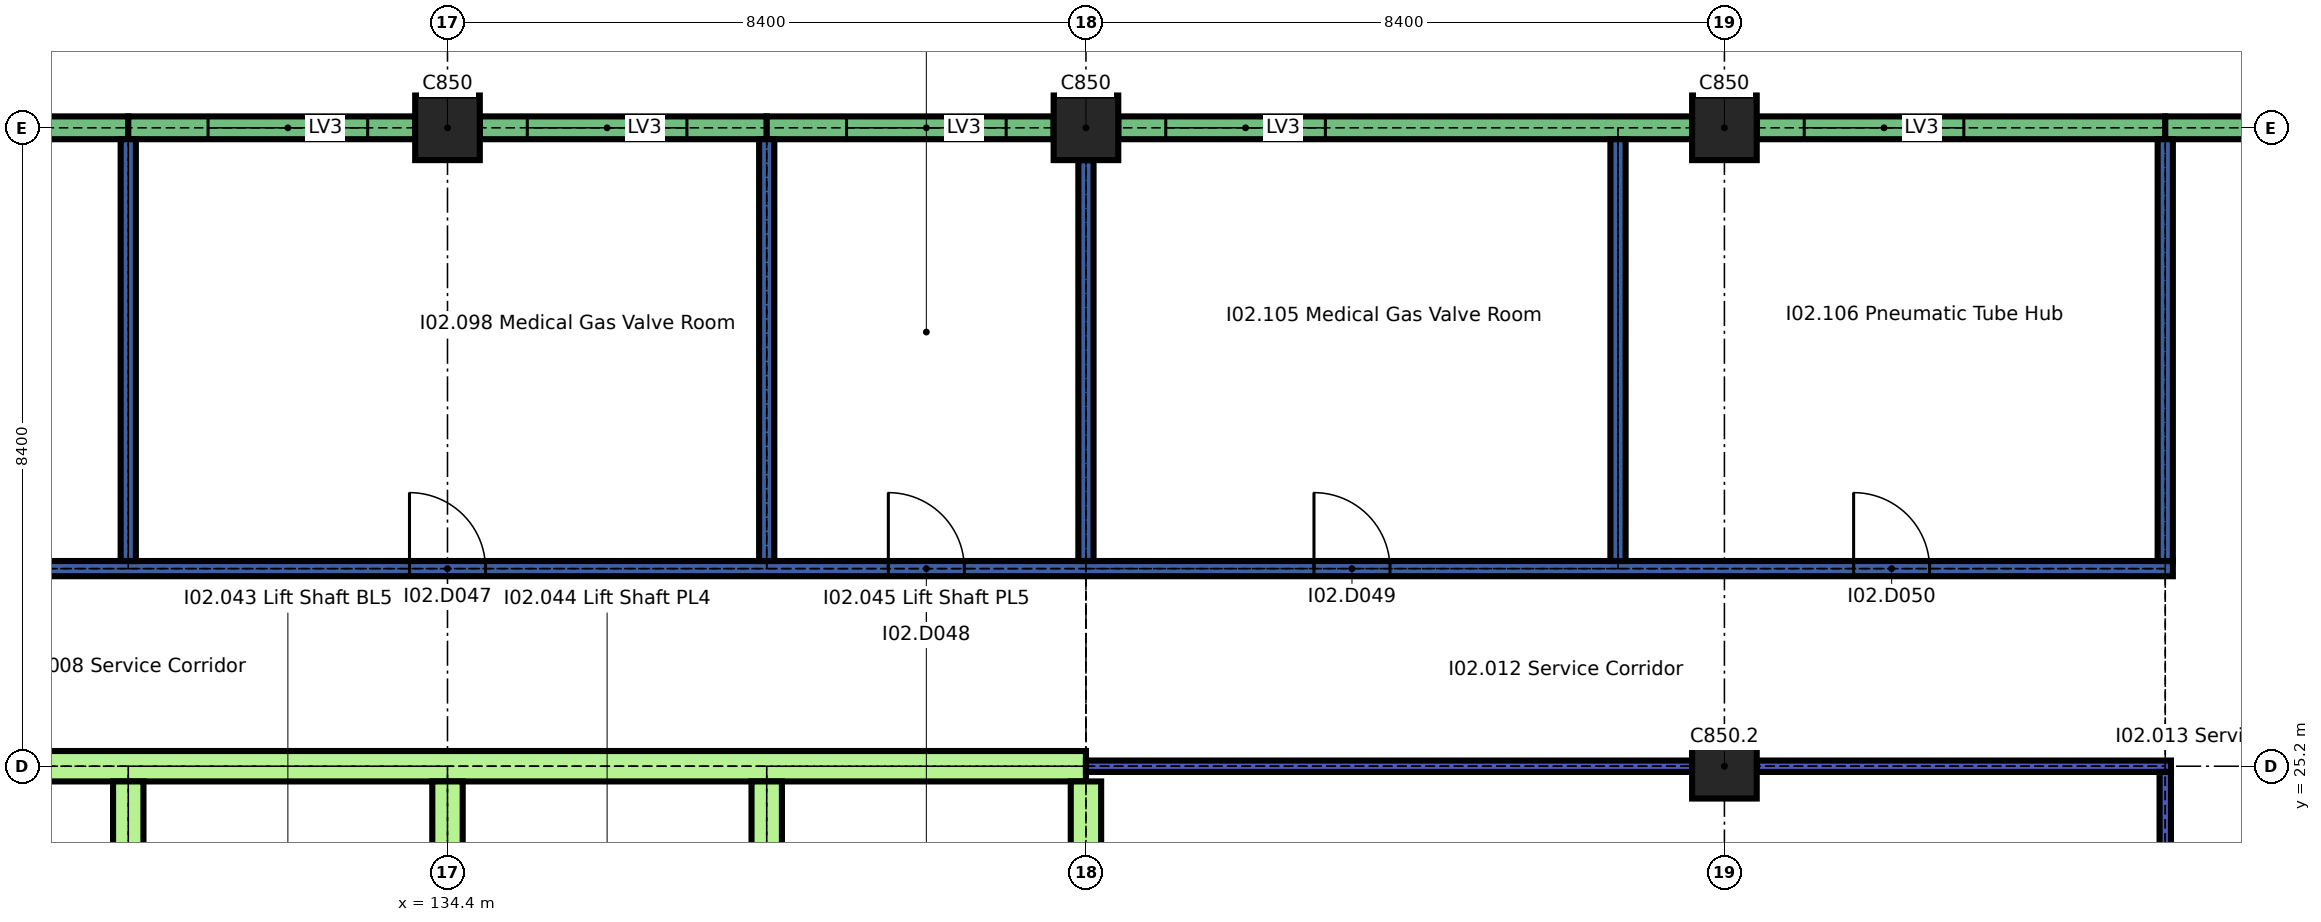
"""IFC4 building model, lengths in metres.
Left out: names, types, materials, properties, quantities, classifications, styles, units other than length and angle.
Written with IfcOpenShell. Run it as: python <this file> out.ifc"""

import sys

from ifc_helpers import new_model, si_unit, direction, frame, frame_2d, origin, origin_2d, place, context, subcontext, project, spatial, rectangle, extrude, element, fill, save


model = new_model("IFC4")
c1 = context("Model", 3, precision=1e-05, world=origin(), true_north=direction((0.0, 1.0)))
c2 = subcontext(c1, "Body", "Model", "MODEL_VIEW")
j1 = project(units=[si_unit("LENGTHUNIT", "METRE"), si_unit("PLANEANGLEUNIT", "RADIAN")], contexts=[c1])
p1 = place(None, origin())
s1 = spatial("IfcSite", under=j1, at=p1, CompositionType="ELEMENT")
p2 = place(p1, origin())
s2 = spatial("IfcBuilding", under=s1, at=p2, CompositionType="ELEMENT")
p3 = place(p2, frame((0.0, 0.0, 12.9)))
s3 = spatial("IfcBuildingStorey", under=s2, at=p3, CompositionType="ELEMENT", Elevation=12.9)
for number, where, z_axis, x_axis in (
    (1, (151.2, 25.2, 0.0), (0.0, 0.0, 1.0), (1.0, 0.0, 0.0)),
    (2, (134.4, 33.6, 0.0), (0.0, 0.0, 1.0), (1.0, 0.0, 0.0)),
    (3, (142.8, 33.6, 0.0), (0.0, 0.0, 1.0), (1.0, 0.0, 0.0)),
    (4, (151.2, 33.6, 0.0), (0.0, 0.0, 1.0), (1.0, 0.0, 0.0)),
):
    element("IfcColumn", number, at=place(p3, frame(where, z_axis=z_axis, x_axis=x_axis)), inside=s3, PredefinedType="COLUMN", context=c2, shape_type="SweptSolid", body=[
        extrude(rectangle(XDim=0.85, YDim=0.85, at=origin_2d()), origin(), (0.0, 0.0, 1.0), 2.04),
    ])
p4 = place(p3, frame((126.425, 33.6, 0.0), z_axis=(0.0, 0.0, 1.0), x_axis=(1.0, 0.0, 0.0)))
e5 = element("IfcWall", 5, at=p4, inside=s3, PredefinedType="SOLIDWALL", context=c2, shape_type="SweptSolid", body=[
    extrude(rectangle(XDim=3.775, YDim=0.3, at=frame_2d((1.887, 0.0))), origin(), (0.0, 0.0, 1.0), 1.74),
])
p5 = place(p4, frame((0.625, 0.0, 0.6)))
e6 = element("IfcOpeningElement", 6, at=p5, cuts=e5, PredefinedType="OPENING", context=c2, shape_type="SweptSolid", body=[
    extrude(rectangle(XDim=2.1, YDim=1.05, at=frame_2d((1.05, 0.525))), frame((0.0, 0.16, 0.0), z_axis=(0.0, -1.0, 0.0), x_axis=(1.0, 0.0, 0.0)), (0.0, 0.0, 1.0), 0.32),
])
p6 = place(p3, frame((130.2, 33.6, 0.0), z_axis=(0.0, 0.0, 1.0), x_axis=(1.0, 0.0, 0.0)))
e7 = element("IfcWall", 7, at=p6, inside=s3, PredefinedType="SOLIDWALL", context=c2, shape_type="SweptSolid", body=[
    extrude(rectangle(XDim=3.775, YDim=0.3, at=frame_2d((1.888, 0.0))), origin(), (0.0, 0.0, 1.0), 1.74),
])
p7 = place(p6, frame((1.05, 0.0, 0.6)))
e8 = element("IfcOpeningElement", 8, at=p7, cuts=e7, PredefinedType="OPENING", context=c2, shape_type="SweptSolid", body=[
    extrude(rectangle(XDim=2.1, YDim=1.05, at=frame_2d((1.05, 0.525))), frame((0.0, 0.16, 0.0), z_axis=(0.0, -1.0, 0.0), x_axis=(1.0, 0.0, 0.0)), (0.0, 0.0, 1.0), 0.32),
])
p8 = place(p3, frame((134.825, 33.6, 0.0), z_axis=(0.0, 0.0, 1.0), x_axis=(1.0, 0.0, 0.0)))
e9 = element("IfcWall", 9, at=p8, inside=s3, PredefinedType="SOLIDWALL", context=c2, shape_type="SweptSolid", body=[
    extrude(rectangle(XDim=3.775, YDim=0.3, at=frame_2d((1.888, 0.0))), origin(), (0.0, 0.0, 1.0), 1.74),
])
p9 = place(p8, frame((0.625, 0.0, 0.6)))
e10 = element("IfcOpeningElement", 10, at=p9, cuts=e9, PredefinedType="OPENING", context=c2, shape_type="SweptSolid", body=[
    extrude(rectangle(XDim=2.1, YDim=1.05, at=frame_2d((1.05, 0.525))), frame((0.0, 0.16, 0.0), z_axis=(0.0, -1.0, 0.0), x_axis=(1.0, 0.0, 0.0)), (0.0, 0.0, 1.0), 0.32),
])
p10 = place(p3, frame((138.6, 33.6, 0.0), z_axis=(0.0, 0.0, 1.0), x_axis=(1.0, 0.0, 0.0)))
e11 = element("IfcWall", 11, at=p10, inside=s3, PredefinedType="SOLIDWALL", context=c2, shape_type="SweptSolid", body=[
    extrude(rectangle(XDim=3.775, YDim=0.3, at=frame_2d((1.887, 0.0))), origin(), (0.0, 0.0, 1.0), 1.74),
])
p11 = place(p10, frame((1.05, 0.0, 0.6)))
e12 = element("IfcOpeningElement", 12, at=p11, cuts=e11, PredefinedType="OPENING", context=c2, shape_type="SweptSolid", body=[
    extrude(rectangle(XDim=2.1, YDim=1.05, at=frame_2d((1.05, 0.525))), frame((0.0, 0.16, 0.0), z_axis=(0.0, -1.0, 0.0), x_axis=(1.0, 0.0, 0.0)), (0.0, 0.0, 1.0), 0.32),
])
p12 = place(p3, frame((143.225, 33.6, 0.0), z_axis=(0.0, 0.0, 1.0), x_axis=(1.0, 0.0, 0.0)))
e13 = element("IfcWall", 13, at=p12, inside=s3, PredefinedType="SOLIDWALL", context=c2, shape_type="SweptSolid", body=[
    extrude(rectangle(XDim=7.55, YDim=0.3, at=frame_2d((3.775, 0.0))), origin(), (0.0, 0.0, 1.0), 1.74),
])
p13 = place(p12, frame((0.625, 0.0, 0.6)))
e14 = element("IfcOpeningElement", 14, at=p13, cuts=e13, PredefinedType="OPENING", context=c2, shape_type="SweptSolid", body=[
    extrude(rectangle(XDim=2.1, YDim=1.05, at=frame_2d((1.05, 0.525))), frame((0.0, 0.16, 0.0), z_axis=(0.0, -1.0, 0.0), x_axis=(1.0, 0.0, 0.0)), (0.0, 0.0, 1.0), 0.32),
])
p14 = place(p3, frame((151.625, 33.6, 0.0), z_axis=(0.0, 0.0, 1.0), x_axis=(1.0, 0.0, 0.0)))
e15 = element("IfcWall", 15, at=p14, inside=s3, PredefinedType="SOLIDWALL", context=c2, shape_type="SweptSolid", body=[
    extrude(rectangle(XDim=5.375, YDim=0.3, at=frame_2d((2.688, 0.0))), origin(), (0.0, 0.0, 1.0), 1.74),
])
p15 = place(p14, frame((0.625, 0.0, 0.6)))
e16 = element("IfcOpeningElement", 16, at=p15, cuts=e15, PredefinedType="OPENING", context=c2, shape_type="SweptSolid", body=[
    extrude(rectangle(XDim=2.1, YDim=1.05, at=frame_2d((1.05, 0.525))), frame((0.0, 0.16, 0.0), z_axis=(0.0, -1.0, 0.0), x_axis=(1.0, 0.0, 0.0)), (0.0, 0.0, 1.0), 0.32),
])
p16 = place(p3, frame((157.0, 33.6, 0.0), z_axis=(0.0, 0.0, 1.0), x_axis=(1.0, 0.0, 0.0)))
e17 = element("IfcWall", 17, at=p16, inside=s3, PredefinedType="SOLIDWALL", context=c2, shape_type="SweptSolid", body=[
    extrude(rectangle(XDim=2.175, YDim=0.3, at=frame_2d((1.087, 0.0))), origin(), (0.0, 0.0, 1.0), 1.74),
])
p17 = place(p3, frame((117.6, 25.2, 0.0), z_axis=(0.0, 0.0, 1.0), x_axis=(1.0, 0.0, 0.0)))
e18 = element("IfcWall", 18, at=p17, inside=s3, PredefinedType="SHEAR", context=c2, shape_type="SweptSolid", body=[
    extrude(rectangle(XDim=25.2, YDim=0.4, at=frame_2d((12.6, 0.0))), origin(), (0.0, 0.0, 1.0), 2.04),
])
p18 = place(p3, frame((142.8, 25.2, 0.0), z_axis=(0.0, 0.0, 1.0), x_axis=(1.0, 0.0, 0.0)))
e19 = element("IfcWall", 19, at=p18, inside=s3, PredefinedType="PARTITIONING", context=c2, shape_type="SweptSolid", body=[
    extrude(rectangle(XDim=7.975, YDim=0.15, at=frame_2d((3.987, 0.0))), origin(), (0.0, 0.0, 1.0), 2.04),
])
p19 = place(p3, frame((151.625, 25.2, 0.0), z_axis=(0.0, 0.0, 1.0), x_axis=(1.0, 0.0, 0.0)))
e20 = element("IfcWall", 20, at=p19, inside=s3, PredefinedType="PARTITIONING", context=c2, shape_type="SweptSolid", body=[
    extrude(rectangle(XDim=5.45, YDim=0.15, at=frame_2d((2.725, 0.0))), origin(), (0.0, 0.0, 1.0), 2.04),
])
p20 = place(p3, frame((117.7, 27.8, 0.0), z_axis=(0.0, 0.0, 1.0), x_axis=(1.0, 0.0, 0.0)))
e21 = element("IfcWall", 21, at=p20, inside=s3, PredefinedType="SOLIDWALL", context=c2, shape_type="SweptSolid", body=[
    extrude(rectangle(XDim=39.4, YDim=0.2, at=frame_2d((19.7, 0.0))), origin(), (0.0, 0.0, 1.0), 2.1),
])
p21 = place(p20, frame((5.55, 0.0, 0.0)))
e22 = element("IfcOpeningElement", 22, at=p21, cuts=e21, PredefinedType="OPENING", context=c2, shape_type="SweptSolid", body=[
    extrude(rectangle(XDim=1.4, YDim=2.0, at=frame_2d((0.7, 1.0))), frame((0.0, 0.11, 0.0), z_axis=(0.0, -1.0, 0.0), x_axis=(1.0, 0.0, 0.0)), (0.0, 0.0, 1.0), 0.22),
])
p22 = place(p20, frame((16.2, 0.0, 0.0)))
e23 = element("IfcOpeningElement", 23, at=p22, cuts=e21, PredefinedType="OPENING", context=c2, shape_type="SweptSolid", body=[
    extrude(rectangle(XDim=1.0, YDim=2.0, at=frame_2d((0.5, 1.0))), frame((0.0, 0.11, 0.0), z_axis=(0.0, -1.0, 0.0), x_axis=(1.0, 0.0, 0.0)), (0.0, 0.0, 1.0), 0.22),
])
p23 = place(p20, frame((22.5, 0.0, 0.0)))
e24 = element("IfcOpeningElement", 24, at=p23, cuts=e21, PredefinedType="OPENING", context=c2, shape_type="SweptSolid", body=[
    extrude(rectangle(XDim=1.0, YDim=2.0, at=frame_2d((0.5, 1.0))), frame((0.0, 0.11, 0.0), z_axis=(0.0, -1.0, 0.0), x_axis=(1.0, 0.0, 0.0)), (0.0, 0.0, 1.0), 0.22),
])
p24 = place(p20, frame((28.1, 0.0, 0.0)))
e25 = element("IfcOpeningElement", 25, at=p24, cuts=e21, PredefinedType="OPENING", context=c2, shape_type="SweptSolid", body=[
    extrude(rectangle(XDim=1.0, YDim=2.0, at=frame_2d((0.5, 1.0))), frame((0.0, 0.11, 0.0), z_axis=(0.0, -1.0, 0.0), x_axis=(1.0, 0.0, 0.0)), (0.0, 0.0, 1.0), 0.22),
])
p25 = place(p20, frame((35.2, 0.0, 0.0)))
e26 = element("IfcOpeningElement", 26, at=p25, cuts=e21, PredefinedType="OPENING", context=c2, shape_type="SweptSolid", body=[
    extrude(rectangle(XDim=1.0, YDim=2.0, at=frame_2d((0.5, 1.0))), frame((0.0, 0.11, 0.0), z_axis=(0.0, -1.0, 0.0), x_axis=(1.0, 0.0, 0.0)), (0.0, 0.0, 1.0), 0.22),
])
p26 = place(p3, frame((130.2, 21.8, 0.0), z_axis=(0.0, 0.0, 1.0), x_axis=(0.0, 1.0, 0.0)))
e27 = element("IfcWall", 27, at=p26, inside=s3, PredefinedType="SHEAR", context=c2, shape_type="SweptSolid", body=[
    extrude(rectangle(XDim=3.2, YDim=0.4, at=frame_2d((1.6, 0.0))), origin(), (0.0, 0.0, 1.0), 2.04),
])
p27 = place(p3, frame((130.2, 27.9, 0.0), z_axis=(0.0, 0.0, 1.0), x_axis=(0.0, 1.0, 0.0)))
e28 = element("IfcWall", 28, at=p27, inside=s3, PredefinedType="SOLIDWALL", context=c2, shape_type="SweptSolid", body=[
    extrude(rectangle(XDim=5.55, YDim=0.2, at=frame_2d((2.775, 0.0))), origin(), (0.0, 0.0, 1.0), 2.1),
])
for number, where, z_axis, x_axis in (
    (29, (134.4, 21.8, 0.0), (0.0, 0.0, 1.0), (0.0, 1.0, 0.0)),
    (30, (138.6, 21.8, 0.0), (0.0, 0.0, 1.0), (0.0, 1.0, 0.0)),
):
    element("IfcWall", number, at=place(p3, frame(where, z_axis=z_axis, x_axis=x_axis)), inside=s3, PredefinedType="SHEAR", context=c2, shape_type="SweptSolid", body=[
        extrude(rectangle(XDim=3.2, YDim=0.4, at=frame_2d((1.6, 0.0))), origin(), (0.0, 0.0, 1.0), 2.04),
    ])
p28 = place(p3, frame((138.6, 27.9, 0.0), z_axis=(0.0, 0.0, 1.0), x_axis=(0.0, 1.0, 0.0)))
e31 = element("IfcWall", 31, at=p28, inside=s3, PredefinedType="SOLIDWALL", context=c2, shape_type="SweptSolid", body=[
    extrude(rectangle(XDim=5.55, YDim=0.2, at=frame_2d((2.775, 0.0))), origin(), (0.0, 0.0, 1.0), 2.1),
])
p29 = place(p3, frame((142.8, 21.6, 0.0), z_axis=(0.0, 0.0, 1.0), x_axis=(0.0, 1.0, 0.0)))
e32 = element("IfcWall", 32, at=p29, inside=s3, PredefinedType="SHEAR", context=c2, shape_type="SweptSolid", body=[
    extrude(rectangle(XDim=3.4, YDim=0.4, at=frame_2d((1.7, 0.0))), origin(), (0.0, 0.0, 1.0), 2.04),
])
p30 = place(p3, frame((142.8, 27.9, 0.0), z_axis=(0.0, 0.0, 1.0), x_axis=(0.0, 1.0, 0.0)))
e33 = element("IfcWall", 33, at=p30, inside=s3, PredefinedType="SOLIDWALL", context=c2, shape_type="SweptSolid", body=[
    extrude(rectangle(XDim=5.275, YDim=0.2, at=frame_2d((2.638, 0.0))), origin(), (0.0, 0.0, 1.0), 2.1),
])
p31 = place(p3, frame((149.8, 27.9, 0.0), z_axis=(0.0, 0.0, 1.0), x_axis=(0.0, 1.0, 0.0)))
e34 = element("IfcWall", 34, at=p31, inside=s3, PredefinedType="SOLIDWALL", context=c2, shape_type="SweptSolid", body=[
    extrude(rectangle(XDim=5.55, YDim=0.2, at=frame_2d((2.775, 0.0))), origin(), (0.0, 0.0, 1.0), 2.1),
])
p32 = place(p3, frame((157.0, 8.5, 0.0), z_axis=(0.0, 0.0, 1.0), x_axis=(0.0, 1.0, 0.0)))
e35 = element("IfcWall", 35, at=p32, inside=s3, PredefinedType="PARTITIONING", context=c2, shape_type="SweptSolid", body=[
    extrude(rectangle(XDim=16.625, YDim=0.15, at=frame_2d((8.312, 0.0))), origin(), (0.0, 0.0, 1.0), 2.04),
])
p33 = place(p32, frame((7.613, 0.0, 0.0)))
e36 = element("IfcOpeningElement", 36, at=p33, cuts=e35, PredefinedType="OPENING", context=c2, shape_type="SweptSolid", body=[
    extrude(rectangle(XDim=1.4, YDim=2.0, at=frame_2d((0.7, 1.0))), frame((0.0, 0.085, 0.0), z_axis=(0.0, -1.0, 0.0), x_axis=(1.0, 0.0, 0.0)), (0.0, 0.0, 1.0), 0.17),
])
p34 = place(p3, frame((157.0, 27.9, 0.0), z_axis=(0.0, 0.0, 1.0), x_axis=(0.0, 1.0, 0.0)))
e37 = element("IfcWall", 37, at=p34, inside=s3, PredefinedType="SOLIDWALL", context=c2, shape_type="SweptSolid", body=[
    extrude(rectangle(XDim=5.55, YDim=0.2, at=frame_2d((2.775, 0.0))), origin(), (0.0, 0.0, 1.0), 2.1),
])
p35 = place(p7, origin())
e38 = element("IfcWindow", 38, at=p35, inside=s3, PartitioningType="SINGLE_PANEL", PredefinedType="WINDOW", context=c2, shape_type="SweptSolid", body=[
    extrude(rectangle(XDim=2.1, YDim=1.05, at=frame_2d((1.05, 0.525))), frame((0.0, 0.075, 0.0), z_axis=(0.0, -1.0, 0.0), x_axis=(1.0, 0.0, 0.0)), (0.0, 0.0, 1.0), 0.15),
])
fill(e8, e38)
p36 = place(p9, origin())
e39 = element("IfcWindow", 39, at=p36, inside=s3, PartitioningType="SINGLE_PANEL", PredefinedType="WINDOW", context=c2, shape_type="SweptSolid", body=[
    extrude(rectangle(XDim=2.1, YDim=1.05, at=frame_2d((1.05, 0.525))), frame((0.0, 0.075, 0.0), z_axis=(0.0, -1.0, 0.0), x_axis=(1.0, 0.0, 0.0)), (0.0, 0.0, 1.0), 0.15),
])
fill(e10, e39)
p37 = place(p11, origin())
e40 = element("IfcWindow", 40, at=p37, inside=s3, PartitioningType="SINGLE_PANEL", PredefinedType="WINDOW", context=c2, shape_type="SweptSolid", body=[
    extrude(rectangle(XDim=2.1, YDim=1.05, at=frame_2d((1.05, 0.525))), frame((0.0, 0.075, 0.0), z_axis=(0.0, -1.0, 0.0), x_axis=(1.0, 0.0, 0.0)), (0.0, 0.0, 1.0), 0.15),
])
fill(e12, e40)
p38 = place(p13, origin())
e41 = element("IfcWindow", 41, at=p38, inside=s3, PartitioningType="SINGLE_PANEL", PredefinedType="WINDOW", context=c2, shape_type="SweptSolid", body=[
    extrude(rectangle(XDim=2.1, YDim=1.05, at=frame_2d((1.05, 0.525))), frame((0.0, 0.075, 0.0), z_axis=(0.0, -1.0, 0.0), x_axis=(1.0, 0.0, 0.0)), (0.0, 0.0, 1.0), 0.15),
])
fill(e14, e41)
p39 = place(p15, origin())
e42 = element("IfcWindow", 42, at=p39, inside=s3, PartitioningType="SINGLE_PANEL", PredefinedType="WINDOW", context=c2, shape_type="SweptSolid", body=[
    extrude(rectangle(XDim=2.1, YDim=1.05, at=frame_2d((1.05, 0.525))), frame((0.0, 0.075, 0.0), z_axis=(0.0, -1.0, 0.0), x_axis=(1.0, 0.0, 0.0)), (0.0, 0.0, 1.0), 0.15),
])
fill(e16, e42)
p40 = place(p22, origin())
e43 = element("IfcDoor", 43, at=p40, inside=s3, OperationType="SINGLE_SWING_RIGHT", PredefinedType="DOOR", context=c2, shape_type="SweptSolid", body=[
    extrude(rectangle(XDim=1.0, YDim=2.0, at=frame_2d((0.5, 1.0))), frame((0.0, 0.025, 0.0), z_axis=(0.0, -1.0, 0.0), x_axis=(1.0, 0.0, 0.0)), (0.0, 0.0, 1.0), 0.05),
])
fill(e23, e43)
p41 = place(p23, origin())
e44 = element("IfcDoor", 44, at=p41, inside=s3, OperationType="SINGLE_SWING_RIGHT", PredefinedType="DOOR", context=c2, shape_type="SweptSolid", body=[
    extrude(rectangle(XDim=1.0, YDim=2.0, at=frame_2d((0.5, 1.0))), frame((0.0, 0.025, 0.0), z_axis=(0.0, -1.0, 0.0), x_axis=(1.0, 0.0, 0.0)), (0.0, 0.0, 1.0), 0.05),
])
fill(e24, e44)
p42 = place(p24, origin())
e45 = element("IfcDoor", 45, at=p42, inside=s3, OperationType="SINGLE_SWING_RIGHT", PredefinedType="DOOR", context=c2, shape_type="SweptSolid", body=[
    extrude(rectangle(XDim=1.0, YDim=2.0, at=frame_2d((0.5, 1.0))), frame((0.0, 0.025, 0.0), z_axis=(0.0, -1.0, 0.0), x_axis=(1.0, 0.0, 0.0)), (0.0, 0.0, 1.0), 0.05),
])
fill(e25, e45)
p43 = place(p25, origin())
e46 = element("IfcDoor", 46, at=p43, inside=s3, OperationType="SINGLE_SWING_RIGHT", PredefinedType="DOOR", context=c2, shape_type="SweptSolid", body=[
    extrude(rectangle(XDim=1.0, YDim=2.0, at=frame_2d((0.5, 1.0))), frame((0.0, 0.025, 0.0), z_axis=(0.0, -1.0, 0.0), x_axis=(1.0, 0.0, 0.0)), (0.0, 0.0, 1.0), 0.05),
])
fill(e26, e46)
save(model, sys.argv[1])
